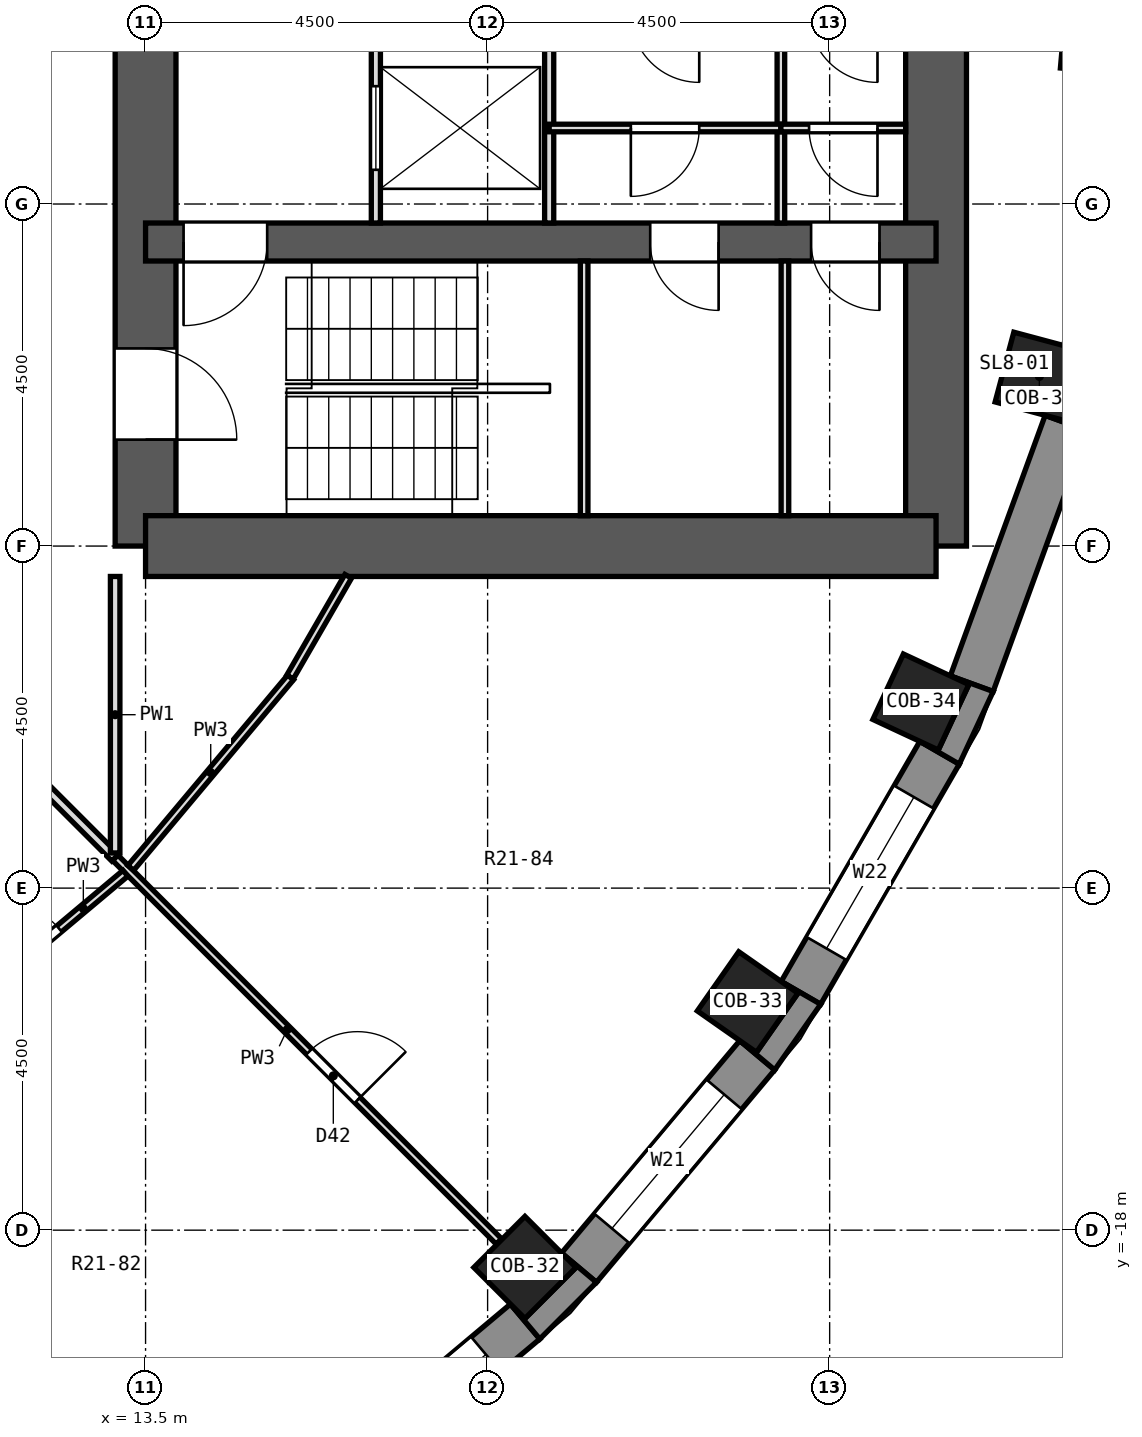
"""IFC4 building model, lengths in metres.
Left out: names, types, materials, properties, quantities, classifications, styles, units other than length and angle.
Written with IfcOpenShell. Run it as: python <this file> out.ifc"""

import sys

from ifc_helpers import new_model, si_unit, direction, frame, frame_2d, origin, origin_2d, place, context, subcontext, project, spatial, polyline, rectangle, outline, extrude, element, fill, save


model = new_model("IFC4")
c1 = context("Model", 3, precision=1e-05, world=origin(), true_north=direction((0.0, 1.0)))
c2 = subcontext(c1, "Body", "Model", "MODEL_VIEW")
j1 = project(units=[si_unit("LENGTHUNIT", "METRE"), si_unit("PLANEANGLEUNIT", "RADIAN")], contexts=[c1])
p1 = place(None, origin())
s1 = spatial("IfcSite", under=j1, at=p1, CompositionType="ELEMENT")
p2 = place(p1, origin())
s2 = spatial("IfcBuilding", under=s1, at=p2, CompositionType="ELEMENT")
p3 = place(p2, frame((0.0, 0.0, 131.5)))
s3 = spatial("IfcBuildingStorey", under=s2, at=p3, CompositionType="ELEMENT", Elevation=131.5)
for number, where, z_axis, x_axis in (
    (1, (18.491, -18.491, 0.0), (0.0, 0.0, 1.0), (0.707, -0.707, 0.0)),
    (2, (21.421, -14.999, 0.0), (0.0, 0.0, 1.0), (0.819, -0.574, 0.0)),
    (3, (23.7, -11.052, 0.0), (0.0, 0.0, 1.0), (0.906, -0.423, 0.0)),
    (4, (25.259, -6.768, 0.0), (0.0, 0.0, 1.0), (0.966, -0.259, 0.0)),
    (5, (26.051, -2.279, 0.0), (0.0, 0.0, 1.0), (0.996, -0.087, 0.0)),
):
    element("IfcColumn", number, at=place(p3, frame(where, z_axis=z_axis, x_axis=x_axis)), inside=s3, PredefinedType="COLUMN", context=c2, shape_type="SweptSolid", body=[
        extrude(rectangle(XDim=0.95, YDim=0.95, at=origin_2d()), origin(), (0.0, 0.0, 1.0), 3.3),
    ])
p4 = place(p3, frame((13.5, -9.0, 0.0), z_axis=(0.0, 0.0, 1.0), x_axis=(0.0, 1.0, 0.0)))
e6 = element("IfcWall", 6, at=p4, inside=s3, PredefinedType="SHEAR", context=c2, shape_type="SweptSolid", body=[
    extrude(rectangle(XDim=18.0, YDim=0.8, at=frame_2d((9.0, 0.0))), origin(), (0.0, 0.0, 1.0), 3.3),
])
p5 = place(p4, frame((15.4, 0.0, 0.0)))
e7 = element("IfcOpeningElement", 7, at=p5, cuts=e6, PredefinedType="OPENING", context=c2, shape_type="SweptSolid", body=[
    extrude(rectangle(XDim=1.2, YDim=2.1, at=frame_2d((0.6, 1.05))), frame((0.0, 0.412, 0.0), z_axis=(0.0, -1.0, 0.0), x_axis=(1.0, 0.0, 0.0)), (0.0, 0.0, 1.0), 0.824),
])
p6 = place(p4, frame((1.4, 0.0, 0.0)))
e8 = element("IfcOpeningElement", 8, at=p6, cuts=e6, PredefinedType="OPENING", context=c2, shape_type="SweptSolid", body=[
    extrude(rectangle(XDim=1.2, YDim=2.1, at=frame_2d((0.6, 1.05))), frame((0.0, 0.412, 0.0), z_axis=(0.0, -1.0, 0.0), x_axis=(1.0, 0.0, 0.0)), (0.0, 0.0, 1.0), 0.824),
])
p7 = place(p4, frame((7.5, 0.0, 0.0)))
e9 = element("IfcOpeningElement", 9, at=p7, cuts=e6, PredefinedType="OPENING", context=c2, shape_type="SweptSolid", body=[
    extrude(rectangle(XDim=3.0, YDim=2.4, at=frame_2d((1.5, 1.2))), frame((0.0, 0.412, 0.0), z_axis=(0.0, -1.0, 0.0), x_axis=(1.0, 0.0, 0.0)), (0.0, 0.0, 1.0), 0.824),
])
p8 = place(p3, frame((23.9, -9.0, 0.0), z_axis=(0.0, 0.0, 1.0), x_axis=(0.0, 1.0, 0.0)))
e10 = element("IfcWall", 10, at=p8, inside=s3, PredefinedType="SHEAR", context=c2, shape_type="SweptSolid", body=[
    extrude(rectangle(XDim=18.0, YDim=0.8, at=frame_2d((9.0, 0.0))), origin(), (0.0, 0.0, 1.0), 3.3),
])
p9 = place(p3, frame((13.5, -9.0, 0.0), z_axis=(0.0, 0.0, 1.0), x_axis=(1.0, 0.0, 0.0)))
e11 = element("IfcWall", 11, at=p9, inside=s3, PredefinedType="SHEAR", context=c2, shape_type="SweptSolid", body=[
    extrude(rectangle(XDim=10.4, YDim=0.8, at=frame_2d((5.2, 0.0))), origin(), (0.0, 0.0, 1.0), 3.3),
])
p10 = place(p3, frame((13.5, -5.0, 0.0), z_axis=(0.0, 0.0, 1.0), x_axis=(1.0, 0.0, 0.0)))
e12 = element("IfcWall", 12, at=p10, inside=s3, PredefinedType="SHEAR", context=c2, shape_type="SweptSolid", body=[
    extrude(rectangle(XDim=10.4, YDim=0.5, at=frame_2d((5.2, 0.0))), origin(), (0.0, 0.0, 1.0), 3.3),
])
p11 = place(p10, frame((6.639, 0.0, 0.0)))
e13 = element("IfcOpeningElement", 13, at=p11, cuts=e12, PredefinedType="OPENING", context=c2, shape_type="SweptSolid", body=[
    extrude(rectangle(XDim=0.9, YDim=2.1, at=frame_2d((0.45, 1.05))), frame((0.0, 0.262, 0.0), z_axis=(0.0, -1.0, 0.0), x_axis=(1.0, 0.0, 0.0)), (0.0, 0.0, 1.0), 0.524),
])
p12 = place(p10, frame((8.756, 0.0, 0.0)))
e14 = element("IfcOpeningElement", 14, at=p12, cuts=e12, PredefinedType="OPENING", context=c2, shape_type="SweptSolid", body=[
    extrude(rectangle(XDim=0.9, YDim=2.1, at=frame_2d((0.45, 1.05))), frame((0.0, 0.262, 0.0), z_axis=(0.0, -1.0, 0.0), x_axis=(1.0, 0.0, 0.0)), (0.0, 0.0, 1.0), 0.524),
])
p13 = place(p10, frame((0.5, 0.0, 0.0)))
e15 = element("IfcOpeningElement", 15, at=p13, cuts=e12, PredefinedType="OPENING", context=c2, shape_type="SweptSolid", body=[
    extrude(rectangle(XDim=1.1, YDim=2.1, at=frame_2d((0.55, 1.05))), frame((0.0, 0.262, 0.0), z_axis=(0.0, -1.0, 0.0), x_axis=(1.0, 0.0, 0.0)), (0.0, 0.0, 1.0), 0.524),
])
p14 = place(p3, frame((15.699, -21.547, 0.0), z_axis=(0.0, 0.0, 1.0), x_axis=(0.766055462616, 0.642774476932, 0.0)))
e16 = element("IfcWall", 16, at=p14, inside=s3, PredefinedType="SOLIDWALL", context=c2, shape_type="SweptSolid", body=[
    extrude(rectangle(XDim=3.648, YDim=0.6, at=frame_2d((1.824, 0.0))), origin(), (0.0, 0.0, 1.0), 2.8),
])
p15 = place(p14, frame((0.674, 0.0, 0.9)))
e17 = element("IfcOpeningElement", 17, at=p15, cuts=e16, PredefinedType="OPENING", context=c2, shape_type="SweptSolid", body=[
    extrude(rectangle(XDim=2.3, YDim=1.8, at=frame_2d((1.15, 0.9))), frame((0.0, 0.312, 0.0), z_axis=(0.0, -1.0, 0.0), x_axis=(1.0, 0.0, 0.0)), (0.0, 0.0, 1.0), 0.624),
])
p16 = place(p3, frame((19.202, -18.494, 0.0), z_axis=(0.0, 0.0, 1.0), x_axis=(0.642774476932, 0.766055462616, 0.0)))
e18 = element("IfcWall", 18, at=p16, inside=s3, PredefinedType="SOLIDWALL", context=c2, shape_type="SweptSolid", body=[
    extrude(rectangle(XDim=3.648, YDim=0.6, at=frame_2d((1.824, 0.0))), origin(), (0.0, 0.0, 1.0), 2.8),
])
p17 = place(p16, frame((0.674, 0.0, 0.9)))
e19 = element("IfcOpeningElement", 19, at=p17, cuts=e18, PredefinedType="OPENING", context=c2, shape_type="SweptSolid", body=[
    extrude(rectangle(XDim=2.3, YDim=1.8, at=frame_2d((1.15, 0.9))), frame((0.0, 0.312, 0.0), z_axis=(0.0, -1.0, 0.0), x_axis=(1.0, 0.0, 0.0)), (0.0, 0.0, 1.0), 0.624),
])
p18 = place(p3, frame((22.122, -14.878, 0.0), z_axis=(0.0, 0.0, 1.0), x_axis=(0.499954196102, 0.866051847062, 0.0)))
e20 = element("IfcWall", 20, at=p18, inside=s3, PredefinedType="SOLIDWALL", context=c2, shape_type="SweptSolid", body=[
    extrude(rectangle(XDim=3.648, YDim=0.6, at=frame_2d((1.824, 0.0))), origin(), (0.0, 0.0, 1.0), 2.8),
])
p19 = place(p18, frame((0.674, 0.0, 0.9)))
e21 = element("IfcOpeningElement", 21, at=p19, cuts=e20, PredefinedType="OPENING", context=c2, shape_type="SweptSolid", body=[
    extrude(rectangle(XDim=2.3, YDim=1.8, at=frame_2d((1.15, 0.9))), frame((0.0, 0.312, 0.0), z_axis=(0.0, -1.0, 0.0), x_axis=(1.0, 0.0, 0.0)), (0.0, 0.0, 1.0), 0.624),
])
p20 = place(p3, frame((24.369, -10.811, 0.0), z_axis=(0.0, 0.0, 1.0), x_axis=(0.341990236633, 0.939703505393, 0.0)))
e22 = element("IfcWall", 22, at=p20, inside=s3, PredefinedType="SOLIDWALL", context=c2, shape_type="SweptSolid", body=[
    extrude(rectangle(XDim=3.648, YDim=0.6, at=frame_2d((1.824, 0.0))), origin(), (0.0, 0.0, 1.0), 2.8),
])
p21 = place(p3, origin())
e23 = element("IfcWall", 23, at=p21, inside=s3, PredefinedType="SOLIDWALL", context=c2, shape_type="SweptSolid", body=[
    extrude(outline(polyline([(18.686, -19.432), (19.432, -18.686), (18.972, -18.301), (19.163, -18.491), (18.491, -19.163), (18.301, -18.972), (18.686, -19.432)])), origin(), (0.0, 0.0, 1.0), 2.8),
])
p22 = place(p3, origin())
e24 = element("IfcWall", 24, at=p22, inside=s3, PredefinedType="SOLIDWALL", context=c2, shape_type="SweptSolid", body=[
    extrude(outline(polyline([(22.382, -15.028), (21.862, -14.728), (22.083, -14.882), (21.538, -15.661), (21.317, -15.506), (21.777, -15.892), (22.382, -15.028)])), origin(), (0.0, 0.0, 1.0), 2.8),
])
p23 = place(p3, origin())
e25 = element("IfcWall", 25, at=p23, inside=s3, PredefinedType="SOLIDWALL", context=c2, shape_type="SweptSolid", body=[
    extrude(outline(polyline([(24.651, -10.913), (24.087, -10.708), (24.331, -10.822), (23.93, -11.683), (23.686, -11.569), (24.206, -11.869), (24.651, -10.913)])), origin(), (0.0, 0.0, 1.0), 2.8),
])
p24 = place(p3, origin())
e26 = element("IfcWall", 26, at=p24, inside=s3, PredefinedType="SOLIDWALL", context=c2, shape_type="SweptSolid", body=[
    extrude(outline(polyline([(25.899, -7.486), (26.172, -6.467), (25.581, -6.363), (25.841, -6.432), (25.595, -7.35), (25.335, -7.28), (25.899, -7.486)])), origin(), (0.0, 0.0, 1.0), 2.8),
])
p25 = place(p3, frame((13.1, -13.1, 0.0), z_axis=(0.0, 0.0, 1.0), x_axis=(0.707106781187, -0.707106781187, 0.0)))
e27 = element("IfcWall", 27, at=p25, inside=s3, PredefinedType="PARTITIONING", context=c2, shape_type="SweptSolid", body=[
    extrude(rectangle(XDim=7.139, YDim=0.1, at=frame_2d((3.569, 0.0))), origin(), (0.0, 0.0, 1.0), 2.8),
])
p26 = place(p25, frame((3.609, 0.0, 0.0)))
e28 = element("IfcOpeningElement", 28, at=p26, cuts=e27, PredefinedType="OPENING", context=c2, shape_type="SweptSolid", body=[
    extrude(rectangle(XDim=0.9, YDim=2.1, at=frame_2d((0.45, 1.05))), frame((0.0, 0.062, 0.0), z_axis=(0.0, -1.0, 0.0), x_axis=(1.0, 0.0, 0.0)), (0.0, 0.0, 1.0), 0.124),
])
p27 = place(p3, frame((7.808, -7.808, 0.0), z_axis=(0.0, 0.0, 1.0), x_axis=(0.707106781187, -0.707106781187, 0.0)))
e29 = element("IfcWall", 29, at=p27, inside=s3, PredefinedType="PARTITIONING", context=c2, shape_type="SweptSolid", body=[
    extrude(rectangle(XDim=7.484, YDim=0.125, at=frame_2d((3.742, 0.0))), origin(), (0.0, 0.0, 1.0), 2.8),
])
p28 = place(p3, frame((10.804, -15.344, 0.0), z_axis=(0.0, 0.0, 1.0), x_axis=(0.766167094934, 0.642641410618, 0.0)))
e30 = element("IfcWall", 30, at=p28, inside=s3, PredefinedType="PARTITIONING", context=c2, shape_type="SweptSolid", body=[
    extrude(rectangle(XDim=3.172, YDim=0.1, at=frame_2d((1.586, 0.0))), origin(), (0.0, 0.0, 1.0), 2.8),
])
p29 = place(p28, frame((1.136, 0.0, 0.0)))
e31 = element("IfcOpeningElement", 31, at=p29, cuts=e30, PredefinedType="OPENING", context=c2, shape_type="SweptSolid", body=[
    extrude(rectangle(XDim=0.9, YDim=2.1, at=frame_2d((0.45, 1.05))), frame((0.0, 0.062, 0.0), z_axis=(0.0, -1.0, 0.0), x_axis=(1.0, 0.0, 0.0)), (0.0, 0.0, 1.0), 0.124),
])
p30 = place(p3, frame((13.305, -13.235, 0.0), z_axis=(0.0, 0.0, 1.0), x_axis=(0.642682886784, 0.766132303871, 0.0)))
e32 = element("IfcWall", 32, at=p30, inside=s3, PredefinedType="PARTITIONING", context=c2, shape_type="SweptSolid", body=[
    extrude(rectangle(XDim=3.273, YDim=0.1, at=frame_2d((1.636, 0.0))), origin(), (0.0, 0.0, 1.0), 2.8),
])
p31 = place(p3, frame((15.401, -10.723, 0.0), z_axis=(0.0, 0.0, 1.0), x_axis=(0.500035603698, 0.866004847004, 0.0)))
e33 = element("IfcWall", 33, at=p31, inside=s3, PredefinedType="PARTITIONING", context=c2, shape_type="SweptSolid", body=[
    extrude(rectangle(XDim=1.53, YDim=0.1, at=frame_2d((0.765, 0.0))), origin(), (0.0, 0.0, 1.0), 2.8),
])
p32 = place(p3, frame((13.1, -13.038, 0.0), z_axis=(0.0, 0.0, 1.0), x_axis=(0.0, 1.0, 0.0)))
e34 = element("IfcWall", 34, at=p32, inside=s3, PredefinedType="PARTITIONING", context=c2, shape_type="SweptSolid", body=[
    extrude(rectangle(XDim=3.638, YDim=0.125, at=frame_2d((1.819, 0.0))), origin(), (0.0, 0.0, 1.0), 2.8),
])
p33 = place(p3, frame((16.53, -4.75, 0.0), z_axis=(0.0, 0.0, 1.0), x_axis=(0.0, 1.0, 0.0)))
e35 = element("IfcWall", 35, at=p33, inside=s3, PredefinedType="PARTITIONING", context=c2, shape_type="SweptSolid", body=[
    extrude(rectangle(XDim=2.5, YDim=0.12, at=frame_2d((1.25, 0.0))), origin(), (0.0, 0.0, 1.0), 2.8),
])
p34 = place(p33, frame((0.7, 0.0, 0.0)))
e36 = element("IfcOpeningElement", 36, at=p34, cuts=e35, PredefinedType="OPENING", context=c2, shape_type="SweptSolid", body=[
    extrude(rectangle(XDim=1.1, YDim=2.1, at=frame_2d((0.55, 1.05))), frame((0.0, 0.072, 0.0), z_axis=(0.0, -1.0, 0.0), x_axis=(1.0, 0.0, 0.0)), (0.0, 0.0, 1.0), 0.144),
])
p35 = place(p3, frame((18.81, -4.75, 0.0), z_axis=(0.0, 0.0, 1.0), x_axis=(0.0, 1.0, 0.0)))
e37 = element("IfcWall", 37, at=p35, inside=s3, PredefinedType="PARTITIONING", context=c2, shape_type="SweptSolid", body=[
    extrude(rectangle(XDim=2.5, YDim=0.12, at=frame_2d((1.25, 0.0))), origin(), (0.0, 0.0, 1.0), 2.8),
])
p36 = place(p3, frame((21.858, -4.75, 0.0), z_axis=(0.0, 0.0, 1.0), x_axis=(0.0, 1.0, 0.0)))
e38 = element("IfcWall", 38, at=p36, inside=s3, PredefinedType="PARTITIONING", context=c2, shape_type="SweptSolid", body=[
    extrude(rectangle(XDim=2.5, YDim=0.1, at=frame_2d((1.25, 0.0))), origin(), (0.0, 0.0, 1.0), 2.8),
])
p37 = place(p3, frame((18.81, -3.5, 0.0), z_axis=(0.0, 0.0, 1.0), x_axis=(1.0, 0.0, 0.0)))
e39 = element("IfcWall", 39, at=p37, inside=s3, PredefinedType="PARTITIONING", context=c2, shape_type="SweptSolid", body=[
    extrude(rectangle(XDim=3.048, YDim=0.1, at=frame_2d((1.524, 0.0))), origin(), (0.0, 0.0, 1.0), 2.8),
])
p38 = place(p37, frame((1.074, 0.0, 0.0)))
e40 = element("IfcOpeningElement", 40, at=p38, cuts=e39, PredefinedType="OPENING", context=c2, shape_type="SweptSolid", body=[
    extrude(rectangle(XDim=0.9, YDim=2.1, at=frame_2d((0.45, 1.05))), frame((0.0, 0.062, 0.0), z_axis=(0.0, -1.0, 0.0), x_axis=(1.0, 0.0, 0.0)), (0.0, 0.0, 1.0), 0.124),
])
p39 = place(p3, frame((21.858, -3.5, 0.0), z_axis=(0.0, 0.0, 1.0), x_axis=(1.0, 0.0, 0.0)))
e41 = element("IfcWall", 41, at=p39, inside=s3, PredefinedType="PARTITIONING", context=c2, shape_type="SweptSolid", body=[
    extrude(rectangle(XDim=1.642, YDim=0.1, at=frame_2d((0.821, 0.0))), origin(), (0.0, 0.0, 1.0), 2.8),
])
p40 = place(p39, frame((0.371, 0.0, 0.0)))
e42 = element("IfcOpeningElement", 42, at=p40, cuts=e41, PredefinedType="OPENING", context=c2, shape_type="SweptSolid", body=[
    extrude(rectangle(XDim=0.9, YDim=2.1, at=frame_2d((0.45, 1.05))), frame((0.0, 0.062, 0.0), z_axis=(0.0, -1.0, 0.0), x_axis=(1.0, 0.0, 0.0)), (0.0, 0.0, 1.0), 0.124),
])
for number, where, z_axis, x_axis in (
    (43, (19.27, -8.6, 0.0), (0.0, 0.0, 1.0), (0.0, 1.0, 0.0)),
    (44, (21.912, -8.6, 0.0), (0.0, 0.0, 1.0), (0.0, 1.0, 0.0)),
):
    element("IfcWall", number, at=place(p3, frame(where, z_axis=z_axis, x_axis=x_axis)), inside=s3, PredefinedType="PARTITIONING", context=c2, shape_type="SweptSolid", body=[
        extrude(rectangle(XDim=3.35, YDim=0.1, at=frame_2d((1.675, 0.0))), origin(), (0.0, 0.0, 1.0), 2.8),
    ])
p41 = place(p15, origin())
e45 = element("IfcWindow", 45, at=p41, inside=s3, PartitioningType="SINGLE_PANEL", PredefinedType="WINDOW", context=c2, shape_type="SweptSolid", body=[
    extrude(rectangle(XDim=2.3, YDim=1.8, at=frame_2d((1.15, 0.9))), frame((0.0, 0.18, 0.0), z_axis=(0.0, -1.0, 0.0), x_axis=(1.0, 0.0, 0.0)), (0.0, 0.0, 1.0), 0.06),
])
fill(e17, e45)
p42 = place(p17, origin())
e46 = element("IfcWindow", 46, at=p42, inside=s3, PartitioningType="SINGLE_PANEL", PredefinedType="WINDOW", context=c2, shape_type="SweptSolid", body=[
    extrude(rectangle(XDim=2.3, YDim=1.8, at=frame_2d((1.15, 0.9))), frame((0.0, 0.18, 0.0), z_axis=(0.0, -1.0, 0.0), x_axis=(1.0, 0.0, 0.0)), (0.0, 0.0, 1.0), 0.06),
])
fill(e19, e46)
p43 = place(p19, origin())
e47 = element("IfcWindow", 47, at=p43, inside=s3, PartitioningType="SINGLE_PANEL", PredefinedType="WINDOW", context=c2, shape_type="SweptSolid", body=[
    extrude(rectangle(XDim=2.3, YDim=1.8, at=frame_2d((1.15, 0.9))), frame((0.0, 0.18, 0.0), z_axis=(0.0, -1.0, 0.0), x_axis=(1.0, 0.0, 0.0)), (0.0, 0.0, 1.0), 0.06),
])
fill(e21, e47)
p44 = place(p29, origin())
e48 = element("IfcDoor", 48, at=p44, inside=s3, OperationType="SINGLE_SWING_LEFT", PredefinedType="DOOR", context=c2, shape_type="SweptSolid", body=[
    extrude(rectangle(XDim=0.9, YDim=2.1, at=frame_2d((0.45, 1.05))), frame((0.0, 0.025, 0.0), z_axis=(0.0, -1.0, 0.0), x_axis=(1.0, 0.0, 0.0)), (0.0, 0.0, 1.0), 0.05),
])
fill(e31, e48)
p45 = place(p26, origin())
e49 = element("IfcDoor", 49, at=p45, inside=s3, OperationType="SINGLE_SWING_RIGHT", PredefinedType="DOOR", context=c2, shape_type="SweptSolid", body=[
    extrude(rectangle(XDim=0.9, YDim=2.1, at=frame_2d((0.45, 1.05))), frame((0.0, 0.025, 0.0), z_axis=(0.0, -1.0, 0.0), x_axis=(1.0, 0.0, 0.0)), (0.0, 0.0, 1.0), 0.05),
])
fill(e28, e49)
p46 = place(p34, origin())
e50 = element("IfcDoor", 50, at=p46, inside=s3, OperationType="DOUBLE_DOOR_SLIDING", PredefinedType="DOOR", context=c2, shape_type="SweptSolid", body=[
    extrude(rectangle(XDim=1.1, YDim=2.1, at=frame_2d((0.55, 1.05))), frame((0.0, 0.025, 0.0), z_axis=(0.0, -1.0, 0.0), x_axis=(1.0, 0.0, 0.0)), (0.0, 0.0, 1.0), 0.05),
])
fill(e36, e50)
p47 = place(p40, frame((0.9, 0.0, 0.0), z_axis=(0.0, 0.0, 1.0), x_axis=(-1.0, 0.0, 0.0)))
e51 = element("IfcDoor", 51, at=p47, inside=s3, OperationType="SINGLE_SWING_LEFT", PredefinedType="DOOR", context=c2, shape_type="SweptSolid", body=[
    extrude(rectangle(XDim=0.9, YDim=2.1, at=frame_2d((0.45, 1.05))), frame((0.0, 0.025, 0.0), z_axis=(0.0, -1.0, 0.0), x_axis=(1.0, 0.0, 0.0)), (0.0, 0.0, 1.0), 0.05),
])
fill(e42, e51)
p48 = place(p38, frame((0.9, 0.0, 0.0), z_axis=(0.0, 0.0, 1.0), x_axis=(-1.0, 0.0, 0.0)))
e52 = element("IfcDoor", 52, at=p48, inside=s3, OperationType="SINGLE_SWING_RIGHT", PredefinedType="DOOR", context=c2, shape_type="SweptSolid", body=[
    extrude(rectangle(XDim=0.9, YDim=2.1, at=frame_2d((0.45, 1.05))), frame((0.0, 0.025, 0.0), z_axis=(0.0, -1.0, 0.0), x_axis=(1.0, 0.0, 0.0)), (0.0, 0.0, 1.0), 0.05),
])
fill(e40, e52)
p49 = place(p11, frame((0.9, 0.0, 0.0), z_axis=(0.0, 0.0, 1.0), x_axis=(-1.0, 0.0, 0.0)))
e53 = element("IfcDoor", 53, at=p49, inside=s3, OperationType="SINGLE_SWING_LEFT", PredefinedType="DOOR", context=c2, shape_type="SweptSolid", body=[
    extrude(rectangle(XDim=0.9, YDim=2.1, at=frame_2d((0.45, 1.05))), frame((0.0, 0.025, 0.0), z_axis=(0.0, -1.0, 0.0), x_axis=(1.0, 0.0, 0.0)), (0.0, 0.0, 1.0), 0.05),
])
fill(e13, e53)
p50 = place(p12, frame((0.9, 0.0, 0.0), z_axis=(0.0, 0.0, 1.0), x_axis=(-1.0, 0.0, 0.0)))
e54 = element("IfcDoor", 54, at=p50, inside=s3, OperationType="SINGLE_SWING_LEFT", PredefinedType="DOOR", context=c2, shape_type="SweptSolid", body=[
    extrude(rectangle(XDim=0.9, YDim=2.1, at=frame_2d((0.45, 1.05))), frame((0.0, 0.025, 0.0), z_axis=(0.0, -1.0, 0.0), x_axis=(1.0, 0.0, 0.0)), (0.0, 0.0, 1.0), 0.05),
])
fill(e14, e54)
p51 = place(p13, frame((1.1, 0.0, 0.0), z_axis=(0.0, 0.0, 1.0), x_axis=(-1.0, 0.0, 0.0)))
e55 = element("IfcDoor", 55, at=p51, inside=s3, OperationType="SINGLE_SWING_RIGHT", PredefinedType="DOOR", context=c2, shape_type="SweptSolid", body=[
    extrude(rectangle(XDim=1.1, YDim=2.1, at=frame_2d((0.55, 1.05))), frame((0.0, 0.025, 0.0), z_axis=(0.0, -1.0, 0.0), x_axis=(1.0, 0.0, 0.0)), (0.0, 0.0, 1.0), 0.05),
])
fill(e15, e55)
p52 = place(p6, frame((1.2, 0.0, 0.0), z_axis=(0.0, 0.0, 1.0), x_axis=(-1.0, 0.0, 0.0)))
e56 = element("IfcDoor", 56, at=p52, inside=s3, OperationType="SINGLE_SWING_RIGHT", PredefinedType="DOOR", context=c2, shape_type="SweptSolid", body=[
    extrude(rectangle(XDim=1.2, YDim=2.1, at=frame_2d((0.6, 1.05))), frame((0.0, 0.025, 0.0), z_axis=(0.0, -1.0, 0.0), x_axis=(1.0, 0.0, 0.0)), (0.0, 0.0, 1.0), 0.05),
])
fill(e8, e56)
save(model, sys.argv[1])
